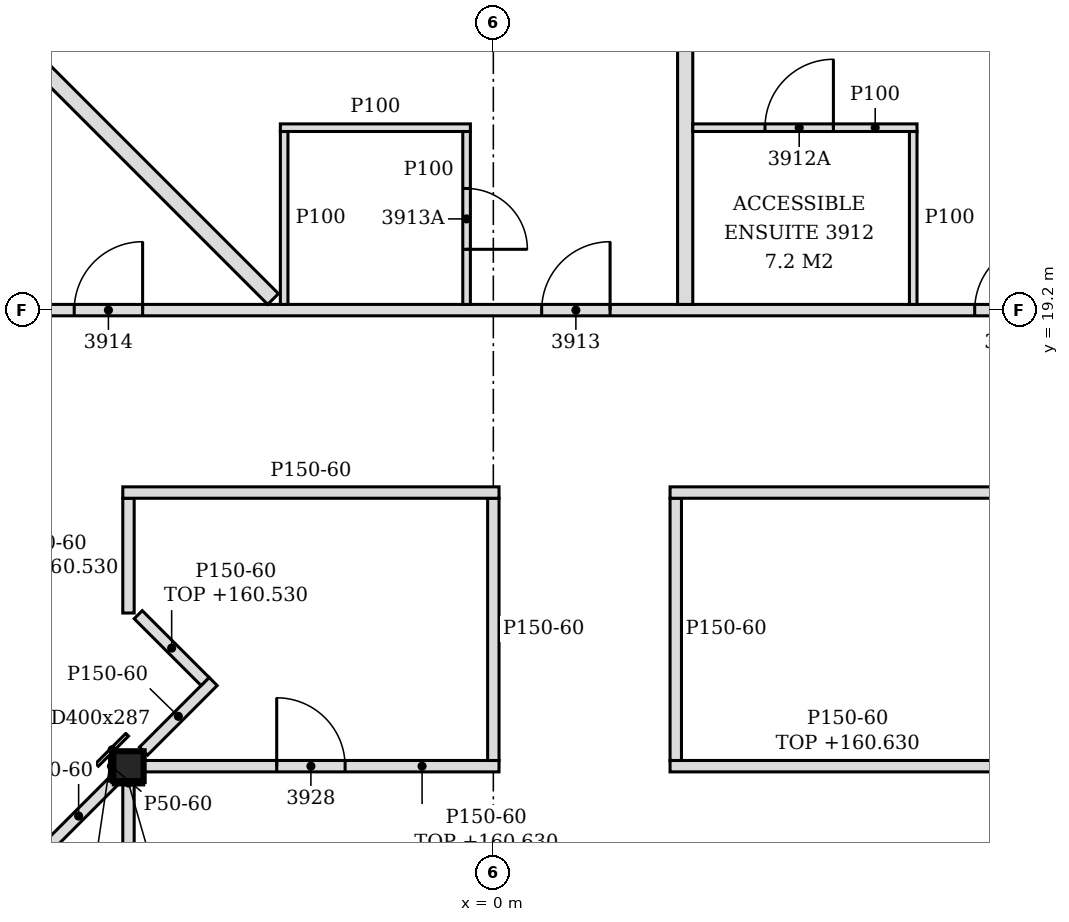
"""IFC4 building model, lengths in metres.
Left out: names, types, materials, properties, quantities, classifications, styles, units other than length and angle.
Written with IfcOpenShell. Run it as: python <this file> out.ifc"""

import sys

from ifc_helpers import new_model, si_unit, direction, frame, frame_2d, origin, origin_2d, place, context, subcontext, project, spatial, polyline, rectangle, i_section, outline, extrude, element, fill, save


model = new_model("IFC4")
c1 = context("Model", 3, precision=1e-05, world=origin(), true_north=direction((0.0, 1.0)))
c2 = subcontext(c1, "Body", "Model", "MODEL_VIEW")
j1 = project(units=[si_unit("LENGTHUNIT", "METRE"), si_unit("PLANEANGLEUNIT", "RADIAN")], contexts=[c1])
p1 = place(None, origin())
s1 = spatial("IfcSite", under=j1, at=p1, CompositionType="ELEMENT")
p2 = place(p1, origin())
s2 = spatial("IfcBuilding", under=s1, at=p2, CompositionType="ELEMENT")
p3 = place(p2, frame((0.0, 0.0, 157.8)))
s3 = spatial("IfcBuildingStorey", under=s2, at=p3, CompositionType="ELEMENT", Elevation=157.8)
p4 = place(p3, frame((-4.8, 13.2, -0.15), z_axis=(0.0, 0.0, 1.0), x_axis=(1.0, 0.0, 0.0)))
e1 = element("IfcColumn", 1, at=p4, inside=s3, PredefinedType="COLUMN", context=c2, shape_type="SweptSolid", body=[
    extrude(i_section(OverallWidth=0.399, OverallDepth=0.393, WebThickness=0.023, FlangeThickness=0.037, FilletRadius=0.015, at=origin_2d()), origin(), (0.0, 0.0, 1.0), 3.6),
])
p5 = place(p3, frame((-4.8, 2.596, 0.0), z_axis=(0.0, 0.0, 1.0), x_axis=(0.0, 1.0, 0.0)))
e2 = element("IfcWall", 2, at=p5, inside=s3, PredefinedType="PARTITIONING", context=c2, shape_type="SweptSolid", body=[
    extrude(rectangle(XDim=10.407, YDim=0.15, at=frame_2d((5.204, 0.0))), origin(), (0.0, 0.0, 1.0), 2.83),
])
p6 = place(p5, frame((0.553, 0.0, 0.0)))
e3 = element("IfcOpeningElement", 3, at=p6, cuts=e2, PredefinedType="OPENING", context=c2, shape_type="SweptSolid", body=[
    extrude(rectangle(XDim=0.9, YDim=2.1, at=frame_2d((0.45, 1.05))), frame((0.0, 0.085, 0.0), z_axis=(0.0, -1.0, 0.0), x_axis=(1.0, 0.0, 0.0)), (0.0, 0.0, 1.0), 0.17),
])
p7 = place(p3, frame((-5.914, 12.086, 0.0), z_axis=(0.0, 0.0, 1.0), x_axis=(0.707106781187, 0.707106781187, 0.0)))
e4 = element("IfcWall", 4, at=p7, inside=s3, PredefinedType="PARTITIONING", context=c2, shape_type="SweptSolid", body=[
    extrude(rectangle(XDim=1.295, YDim=0.15, at=frame_2d((0.648, 0.0))), origin(), (0.0, 0.0, 1.0), 3.45),
])
p8 = place(p3, frame((-4.601, 13.2, 0.0), z_axis=(0.0, 0.0, 1.0), x_axis=(1.0, 0.0, 0.0)))
e5 = element("IfcWall", 5, at=p8, inside=s3, PredefinedType="PARTITIONING", context=c2, shape_type="SweptSolid", body=[
    extrude(rectangle(XDim=4.676, YDim=0.15, at=frame_2d((2.338, 0.0))), origin(), (0.0, 0.0, 1.0), 2.83),
])
p9 = place(p8, frame((1.75, 0.0, 0.0)))
e6 = element("IfcOpeningElement", 6, at=p9, cuts=e5, PredefinedType="OPENING", context=c2, shape_type="SweptSolid", body=[
    extrude(rectangle(XDim=0.9, YDim=2.1, at=frame_2d((0.45, 1.05))), frame((0.0, 0.085, 0.0), z_axis=(0.0, -1.0, 0.0), x_axis=(1.0, 0.0, 0.0)), (0.0, 0.0, 1.0), 0.17),
])
p10 = place(p3, frame((2.325, 13.2, 0.0), z_axis=(0.0, 0.0, 1.0), x_axis=(1.0, 0.0, 0.0)))
e7 = element("IfcWall", 7, at=p10, inside=s3, PredefinedType="PARTITIONING", context=c2, shape_type="SweptSolid", body=[
    extrude(rectangle(XDim=4.676, YDim=0.15, at=frame_2d((2.338, 0.0))), origin(), (0.0, 0.0, 1.0), 2.83),
])
for number, where, z_axis, x_axis in (
    (8, (0.0, 13.275, 0.0), (0.0, 0.0, 1.0), (0.0, 1.0, 0.0)),
    (9, (2.4, 13.275, 0.0), (0.0, 0.0, 1.0), (0.0, 1.0, 0.0)),
):
    element("IfcWall", number, at=place(p3, frame(where, z_axis=z_axis, x_axis=x_axis)), inside=s3, PredefinedType="PARTITIONING", context=c2, shape_type="SweptSolid", body=[
        extrude(outline(polyline([(0.0, 0.0), (3.45, 0.0), (3.45, 3.45), (0.075, 3.45), (0.073, 2.83), (0.0, 2.83), (0.0, 0.0)])), frame((0.0, 0.075, 0.0), z_axis=(0.0, -1.0, 0.0), x_axis=(1.0, 0.0, 0.0)), (0.0, 0.0, 1.0), 0.15),
    ])
p11 = place(p3, frame((-4.602, 13.398, 0.0), z_axis=(0.0, 0.0, 1.0), x_axis=(0.707106781187, 0.707106781187, 0.0)))
e10 = element("IfcWall", 10, at=p11, inside=s3, PredefinedType="PARTITIONING", context=c2, shape_type="SweptSolid", body=[
    extrude(rectangle(XDim=1.296, YDim=0.15, at=frame_2d((0.648, 0.0))), origin(), (0.0, 0.0, 1.0), 3.45),
])
p12 = place(p3, frame((-3.792, 14.314, 0.0), z_axis=(0.0, 0.0, 1.0), x_axis=(-0.707499182195, 0.706714162298, 0.0)))
e11 = element("IfcWall", 11, at=p12, inside=s3, PredefinedType="PARTITIONING", context=c2, shape_type="SweptSolid", body=[
    extrude(rectangle(XDim=1.244, YDim=0.15, at=frame_2d((0.622, 0.0))), origin(), (0.0, 0.0, 1.0), 2.73),
])
p13 = place(p3, frame((-4.8, 15.215, 0.0), z_axis=(0.0, 0.0, 1.0), x_axis=(0.0, 1.0, 0.0)))
e12 = element("IfcWall", 12, at=p13, inside=s3, PredefinedType="PARTITIONING", context=c2, shape_type="SweptSolid", body=[
    extrude(rectangle(XDim=1.51, YDim=0.15, at=frame_2d((0.755, 0.0))), origin(), (0.0, 0.0, 1.0), 2.73),
])
p14 = place(p3, frame((-4.875, 16.8, 0.0), z_axis=(0.0, 0.0, 1.0), x_axis=(1.0, 0.0, 0.0)))
e13 = element("IfcWall", 13, at=p14, inside=s3, PredefinedType="PARTITIONING", context=c2, shape_type="SweptSolid", body=[
    extrude(outline(polyline([(0.0, 0.0), (4.95, 0.0), (4.95, 3.45), (0.225, 3.45), (0.223, 2.73), (0.0, 2.73), (0.0, 0.0)])), frame((0.0, 0.075, 0.0), z_axis=(0.0, -1.0, 0.0), x_axis=(1.0, 0.0, 0.0)), (0.0, 0.0, 1.0), 0.15),
])
p15 = place(p3, frame((2.325, 16.8, 0.0), z_axis=(0.0, 0.0, 1.0), x_axis=(1.0, 0.0, 0.0)))
e14 = element("IfcWall", 14, at=p15, inside=s3, PredefinedType="PARTITIONING", context=c2, shape_type="SweptSolid", body=[
    extrude(outline(polyline([(0.0, 0.0), (16.95, 0.0), (16.95, 2.73), (16.725, 2.73), (16.723, 3.45), (5.025, 3.45), (5.023, 2.73), (4.725, 2.73), (4.723, 3.45), (0.0, 3.45), (0.0, 0.0)])), frame((0.0, 0.075, 0.0), z_axis=(0.0, -1.0, 0.0), x_axis=(1.0, 0.0, 0.0)), (0.0, 0.0, 1.0), 0.15),
])
p16 = place(p3, frame((-8.421, 19.2, 0.0), z_axis=(0.0, 0.0, 1.0), x_axis=(1.0, 0.0, 0.0)))
e15 = element("IfcWall", 15, at=p16, inside=s3, PredefinedType="PARTITIONING", context=c2, shape_type="SweptSolid", body=[
    extrude(outline(polyline([(0.0, 0.0), (31.242, 0.0), (31.242, 2.88), (27.771, 2.88), (27.769, 2.73), (27.471, 2.73), (27.469, 2.88), (15.771, 2.88), (15.769, 2.73), (15.471, 2.73), (15.469, 2.88), (3.771, 2.88), (3.769, 2.73), (3.471, 2.73), (3.469, 2.88), (0.0, 2.88), (0.0, 0.0)])), frame((0.0, 0.075, 0.0), z_axis=(0.0, -1.0, 0.0), x_axis=(1.0, 0.0, 0.0)), (0.0, 0.0, 1.0), 0.15),
])
p17 = place(p16, frame((25.997, 0.0, 0.0)))
e16 = element("IfcOpeningElement", 16, at=p17, cuts=e15, PredefinedType="OPENING", context=c2, shape_type="SweptSolid", body=[
    extrude(rectangle(XDim=0.9, YDim=2.1, at=frame_2d((0.45, 1.05))), frame((0.0, 0.085, 0.0), z_axis=(0.0, -1.0, 0.0), x_axis=(1.0, 0.0, 0.0)), (0.0, 0.0, 1.0), 0.17),
])
p18 = place(p16, frame((17.93, 0.0, 0.0)))
e17 = element("IfcOpeningElement", 17, at=p18, cuts=e15, PredefinedType="OPENING", context=c2, shape_type="SweptSolid", body=[
    extrude(rectangle(XDim=0.9, YDim=2.1, at=frame_2d((0.45, 1.05))), frame((0.0, 0.085, 0.0), z_axis=(0.0, -1.0, 0.0), x_axis=(1.0, 0.0, 0.0)), (0.0, 0.0, 1.0), 0.17),
])
p19 = place(p16, frame((14.754, 0.0, 0.0)))
e18 = element("IfcOpeningElement", 18, at=p19, cuts=e15, PredefinedType="OPENING", context=c2, shape_type="SweptSolid", body=[
    extrude(rectangle(XDim=0.9, YDim=2.1, at=frame_2d((0.45, 1.05))), frame((0.0, 0.085, 0.0), z_axis=(0.0, -1.0, 0.0), x_axis=(1.0, 0.0, 0.0)), (0.0, 0.0, 1.0), 0.17),
])
p20 = place(p16, frame((9.057, 0.0, 0.0)))
e19 = element("IfcOpeningElement", 19, at=p20, cuts=e15, PredefinedType="OPENING", context=c2, shape_type="SweptSolid", body=[
    extrude(rectangle(XDim=0.9, YDim=2.1, at=frame_2d((0.45, 1.05))), frame((0.0, 0.085, 0.0), z_axis=(0.0, -1.0, 0.0), x_axis=(1.0, 0.0, 0.0)), (0.0, 0.0, 1.0), 0.17),
])
p21 = place(p16, frame((2.907, 0.0, 0.0)))
e20 = element("IfcOpeningElement", 20, at=p21, cuts=e15, PredefinedType="OPENING", context=c2, shape_type="SweptSolid", body=[
    extrude(rectangle(XDim=0.9, YDim=2.1, at=frame_2d((0.45, 1.05))), frame((0.0, 0.085, 0.0), z_axis=(0.0, -1.0, 0.0), x_axis=(1.0, 0.0, 0.0)), (0.0, 0.0, 1.0), 0.17),
])
p22 = place(p3, frame((-2.898, 19.346, 0.0), z_axis=(0.0, 0.0, 1.0), x_axis=(-0.707106781187, 0.707106781187, 0.0)))
e21 = element("IfcWall", 21, at=p22, inside=s3, PredefinedType="PARTITIONING", context=c2, shape_type="SweptSolid", body=[
    extrude(rectangle(XDim=9.347, YDim=0.2, at=frame_2d((4.674, 0.0))), origin(), (0.0, 0.0, 1.0), 2.73),
])
p23 = place(p3, frame((-2.752, 19.275, 0.0), z_axis=(0.0, 0.0, 1.0), x_axis=(0.0, 1.0, 0.0)))
e22 = element("IfcWall", 22, at=p23, inside=s3, PredefinedType="PARTITIONING", context=c2, shape_type="SweptSolid", body=[
    extrude(outline(polyline([(0.0, 0.0), (2.275, 0.0), (2.275, 3.45), (0.03, 3.45), (0.028, 2.88), (0.0, 2.88), (0.0, 0.0)])), frame((0.0, 0.05, 0.0), z_axis=(0.0, -1.0, 0.0), x_axis=(1.0, 0.0, 0.0)), (0.0, 0.0, 1.0), 0.1),
])
p24 = place(p3, frame((-0.352, 19.275, 0.0), z_axis=(0.0, 0.0, 1.0), x_axis=(0.0, 1.0, 0.0)))
e23 = element("IfcWall", 23, at=p24, inside=s3, PredefinedType="PARTITIONING", context=c2, shape_type="SweptSolid", body=[
    extrude(outline(polyline([(0.0, 0.0), (2.275, 0.0), (2.275, 3.45), (0.03, 3.45), (0.028, 2.88), (0.0, 2.88), (0.0, 0.0)])), frame((0.0, 0.05, 0.0), z_axis=(0.0, -1.0, 0.0), x_axis=(1.0, 0.0, 0.0)), (0.0, 0.0, 1.0), 0.1),
])
p25 = place(p24, frame((0.725, 0.0, 0.0)))
e24 = element("IfcOpeningElement", 24, at=p25, cuts=e23, PredefinedType="OPENING", context=c2, shape_type="SweptSolid", body=[
    extrude(rectangle(XDim=0.8, YDim=2.1, at=frame_2d((0.4, 1.05))), frame((0.0, 0.06, 0.0), z_axis=(0.0, -1.0, 0.0), x_axis=(1.0, 0.0, 0.0)), (0.0, 0.0, 1.0), 0.12),
])
p26 = place(p3, frame((2.524, 19.275, 0.0), z_axis=(0.0, 0.0, 1.0), x_axis=(0.0, 1.0, 0.0)))
e25 = element("IfcWall", 25, at=p26, inside=s3, PredefinedType="PARTITIONING", context=c2, shape_type="SweptSolid", body=[
    extrude(outline(polyline([(0.0, 0.0), (8.325, 0.0), (8.325, 3.45), (4.83, 3.45), (4.828, 2.88), (4.62, 2.88), (4.618, 3.45), (0.03, 3.45), (0.028, 2.88), (0.0, 2.88), (0.0, 0.0)])), frame((0.0, 0.1, 0.0), z_axis=(0.0, -1.0, 0.0), x_axis=(1.0, 0.0, 0.0)), (0.0, 0.0, 1.0), 0.2),
])
p27 = place(p3, frame((5.524, 19.275, 0.0), z_axis=(0.0, 0.0, 1.0), x_axis=(0.0, 1.0, 0.0)))
e26 = element("IfcWall", 26, at=p27, inside=s3, PredefinedType="PARTITIONING", context=c2, shape_type="SweptSolid", body=[
    extrude(outline(polyline([(0.0, 0.0), (2.275, 0.0), (2.275, 3.45), (0.03, 3.45), (0.028, 2.88), (0.0, 2.88), (0.0, 0.0)])), frame((0.0, 0.05, 0.0), z_axis=(0.0, -1.0, 0.0), x_axis=(1.0, 0.0, 0.0)), (0.0, 0.0, 1.0), 0.1),
])
p28 = place(p3, frame((-2.802, 21.6, 0.0), z_axis=(0.0, 0.0, 1.0), x_axis=(1.0, 0.0, 0.0)))
e27 = element("IfcWall", 27, at=p28, inside=s3, PredefinedType="PARTITIONING", context=c2, shape_type="SweptSolid", body=[
    extrude(rectangle(XDim=2.5, YDim=0.1, at=frame_2d((1.25, 0.0))), origin(), (0.0, 0.0, 1.0), 3.45),
])
p29 = place(p3, frame((2.624, 21.6, 0.0), z_axis=(0.0, 0.0, 1.0), x_axis=(1.0, 0.0, 0.0)))
e28 = element("IfcWall", 28, at=p29, inside=s3, PredefinedType="PARTITIONING", context=c2, shape_type="SweptSolid", body=[
    extrude(rectangle(XDim=2.95, YDim=0.1, at=frame_2d((1.475, 0.0))), origin(), (0.0, 0.0, 1.0), 3.45),
])
p30 = place(p29, frame((0.95, 0.0, 0.0)))
e29 = element("IfcOpeningElement", 29, at=p30, cuts=e28, PredefinedType="OPENING", context=c2, shape_type="SweptSolid", body=[
    extrude(rectangle(XDim=0.9, YDim=2.1, at=frame_2d((0.45, 1.05))), frame((0.0, 0.06, 0.0), z_axis=(0.0, -1.0, 0.0), x_axis=(1.0, 0.0, 0.0)), (0.0, 0.0, 1.0), 0.12),
])
p31 = place(p3, frame((-5.024, 13.003, 0.0), z_axis=(0.0, 0.0, 1.0), x_axis=(0.0, 1.0, 0.0)))
e30 = element("IfcWall", 30, at=p31, inside=s3, PredefinedType="PARTITIONING", context=c2, shape_type="SweptSolid", body=[
    extrude(rectangle(XDim=0.393, YDim=0.05, at=frame_2d((0.197, 0.0))), origin(), (0.0, 0.0, 1.0), 3.45),
])
p32 = place(p3, frame((-5.214, 13.218, 0.0), z_axis=(0.0, 0.0, 1.0), x_axis=(0.707106781187, 0.707106781187, 0.0)))
e31 = element("IfcWall", 31, at=p32, inside=s3, PredefinedType="PARTITIONING", context=c2, shape_type="SweptSolid", body=[
    extrude(rectangle(XDim=0.56, YDim=0.05, at=frame_2d((0.28, 0.0))), origin(), (0.0, 0.0, 1.0), 2.73),
])
p33 = place(p3, frame((-5.0, 12.979, 0.0), z_axis=(0.0, 0.0, 1.0), x_axis=(1.0, 0.0, 0.0)))
e32 = element("IfcWall", 32, at=p33, inside=s3, PredefinedType="PARTITIONING", context=c2, shape_type="SweptSolid", body=[
    extrude(rectangle(XDim=0.399, YDim=0.05, at=frame_2d((0.199, 0.0))), origin(), (0.0, 0.0, 1.0), 2.83),
])
p34 = place(p19, origin())
e33 = element("IfcDoor", 33, at=p34, inside=s3, OperationType="SINGLE_SWING_RIGHT", PredefinedType="DOOR", context=c2, shape_type="SweptSolid", body=[
    extrude(rectangle(XDim=0.9, YDim=2.1, at=frame_2d((0.45, 1.05))), frame((0.0, 0.025, 0.0), z_axis=(0.0, -1.0, 0.0), x_axis=(1.0, 0.0, 0.0)), (0.0, 0.0, 1.0), 0.05),
])
fill(e18, e33)
p35 = place(p30, origin())
e34 = element("IfcDoor", 34, at=p35, inside=s3, OperationType="SINGLE_SWING_RIGHT", PredefinedType="DOOR", context=c2, shape_type="SweptSolid", body=[
    extrude(rectangle(XDim=0.9, YDim=2.1, at=frame_2d((0.45, 1.05))), frame((0.0, 0.025, 0.0), z_axis=(0.0, -1.0, 0.0), x_axis=(1.0, 0.0, 0.0)), (0.0, 0.0, 1.0), 0.05),
])
fill(e29, e34)
p36 = place(p20, origin())
e35 = element("IfcDoor", 35, at=p36, inside=s3, OperationType="SINGLE_SWING_RIGHT", PredefinedType="DOOR", context=c2, shape_type="SweptSolid", body=[
    extrude(rectangle(XDim=0.9, YDim=2.1, at=frame_2d((0.45, 1.05))), frame((0.0, 0.025, 0.0), z_axis=(0.0, -1.0, 0.0), x_axis=(1.0, 0.0, 0.0)), (0.0, 0.0, 1.0), 0.05),
])
fill(e19, e35)
p37 = place(p25, frame((0.8, 0.0, 0.0), z_axis=(0.0, 0.0, 1.0), x_axis=(-1.0, 0.0, 0.0)))
e36 = element("IfcDoor", 36, at=p37, inside=s3, OperationType="SINGLE_SWING_RIGHT", PredefinedType="DOOR", context=c2, shape_type="SweptSolid", body=[
    extrude(rectangle(XDim=0.8, YDim=2.1, at=frame_2d((0.4, 1.05))), frame((0.0, 0.025, 0.0), z_axis=(0.0, -1.0, 0.0), x_axis=(1.0, 0.0, 0.0)), (0.0, 0.0, 1.0), 0.05),
])
fill(e24, e36)
p38 = place(p21, origin())
e37 = element("IfcDoor", 37, at=p38, inside=s3, OperationType="SINGLE_SWING_RIGHT", PredefinedType="DOOR", context=c2, shape_type="SweptSolid", body=[
    extrude(rectangle(XDim=0.9, YDim=2.1, at=frame_2d((0.45, 1.05))), frame((0.0, 0.025, 0.0), z_axis=(0.0, -1.0, 0.0), x_axis=(1.0, 0.0, 0.0)), (0.0, 0.0, 1.0), 0.05),
])
fill(e20, e37)
p39 = place(p9, origin())
e38 = element("IfcDoor", 38, at=p39, inside=s3, OperationType="SINGLE_SWING_LEFT", PredefinedType="DOOR", context=c2, shape_type="SweptSolid", body=[
    extrude(rectangle(XDim=0.9, YDim=2.1, at=frame_2d((0.45, 1.05))), frame((0.0, 0.025, 0.0), z_axis=(0.0, -1.0, 0.0), x_axis=(1.0, 0.0, 0.0)), (0.0, 0.0, 1.0), 0.05),
])
fill(e6, e38)
save(model, sys.argv[1])
